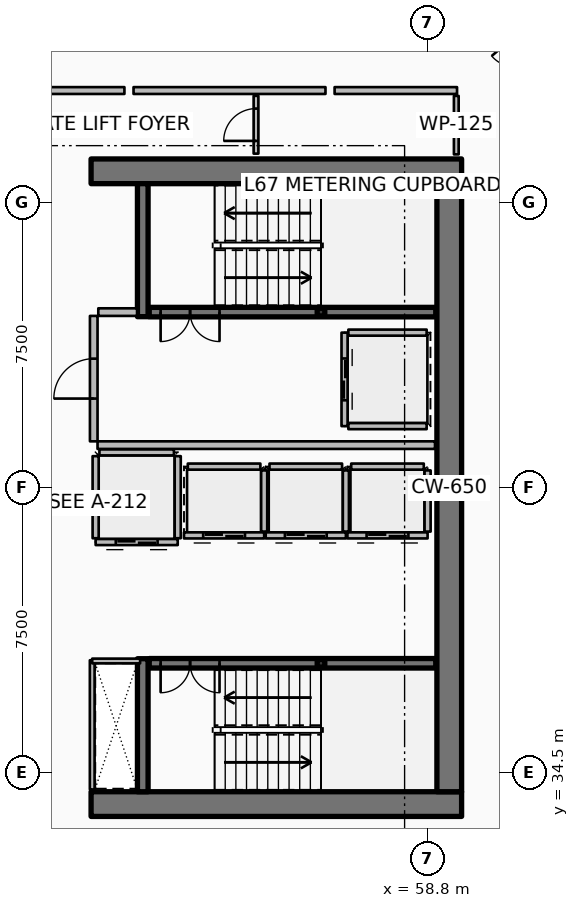
"""IFC4 building model, lengths in metres.
Left out: names, types, materials, properties, quantities, classifications, styles, units other than length and angle.
Written with IfcOpenShell. Run it as: python <this file> out.ifc"""

import sys

from ifc_helpers import new_model, si_unit, direction, frame, frame_2d, origin, origin_2d, place, context, subcontext, project, spatial, rectangle, hollow_rectangle, extrude, element, fill, save


model = new_model("IFC4")
c1 = context("Model", 3, precision=1e-05, world=origin(), true_north=direction((0.0, 1.0)))
c2 = subcontext(c1, "Body", "Model", "MODEL_VIEW")
j1 = project(units=[si_unit("LENGTHUNIT", "METRE"), si_unit("PLANEANGLEUNIT", "RADIAN")], contexts=[c1])
p1 = place(None, origin())
s1 = spatial("IfcSite", under=j1, at=p1, CompositionType="ELEMENT")
p2 = place(p1, origin())
s2 = spatial("IfcBuilding", under=s1, at=p2, CompositionType="ELEMENT")
p3 = place(p2, frame((0.0, 0.0, 267.5)))
s3 = spatial("IfcBuildingStorey", under=s2, at=p3, CompositionType="ELEMENT", Elevation=267.5)
for number, where, z_axis, x_axis in (
    (1, (49.95, 33.675, 0.0), (0.0, 0.0, 1.0), (1.0, 0.0, 0.0)),
    (2, (49.95, 50.325, 0.0), (0.0, 0.0, 1.0), (1.0, 0.0, 0.0)),
):
    element("IfcWall", number, at=place(p3, frame(where, z_axis=z_axis, x_axis=x_axis)), inside=s3, PredefinedType="SHEAR", context=c2, shape_type="SweptSolid", body=[
        extrude(rectangle(XDim=9.75, YDim=0.65, at=frame_2d((4.875, 0.0))), origin(), (0.0, 0.0, 1.0), 3.85),
    ])
p4 = place(p3, frame((59.375, 34.0, 0.0), z_axis=(0.0, 0.0, 1.0), x_axis=(0.0, 1.0, 0.0)))
e3 = element("IfcWall", 3, at=p4, inside=s3, PredefinedType="SHEAR", context=c2, shape_type="SweptSolid", body=[
    extrude(rectangle(XDim=16.0, YDim=0.65, at=frame_2d((8.0, 0.0))), origin(), (0.0, 0.0, 1.0), 3.85),
])
for number, where, z_axis, x_axis in (
    (4, (51.31, 46.5, 0.0), (0.0, 0.0, 1.0), (0.0, 1.0, 0.0)),
    (5, (51.31, 34.0, 0.0), (0.0, 0.0, 1.0), (0.0, 1.0, 0.0)),
):
    element("IfcWall", number, at=place(p3, frame(where, z_axis=z_axis, x_axis=x_axis)), inside=s3, PredefinedType="SHEAR", context=c2, shape_type="SweptSolid", body=[
        extrude(rectangle(XDim=3.5, YDim=0.28, at=frame_2d((1.75, 0.0))), origin(), (0.0, 0.0, 1.0), 3.85),
    ])
for number, where, z_axis, x_axis in (
    (6, (56.0, 46.62, 0.0), (0.0, 0.0, 1.0), (1.0, 0.0, 0.0)),
    (7, (56.0, 37.38, 0.0), (0.0, 0.0, 1.0), (1.0, 0.0, 0.0)),
):
    element("IfcColumn", number, at=place(p3, frame(where, z_axis=z_axis, x_axis=x_axis)), inside=s3, PredefinedType="COLUMN", context=c2, shape_type="SweptSolid", body=[
        extrude(hollow_rectangle(XDim=0.2, YDim=0.2, WallThickness=0.01, InnerFilletRadius=0.01, OuterFilletRadius=0.02, at=origin_2d()), origin(), (0.0, 0.0, 1.0), 1.72),
    ])
p5 = place(p3, frame((51.48, 46.62, 0.0), z_axis=(0.0, 0.0, 1.0), x_axis=(1.0, 0.0, 0.0)))
e8 = element("IfcWall", 8, at=p5, inside=s3, PredefinedType="SOLIDWALL", context=c2, shape_type="SweptSolid", body=[
    extrude(rectangle(XDim=7.54, YDim=0.25, at=frame_2d((3.77, 0.0))), origin(), (0.0, 0.0, 1.0), 3.59),
])
p6 = place(p5, frame((0.3, 0.0, 0.0)))
e9 = element("IfcOpeningElement", 9, at=p6, cuts=e8, PredefinedType="OPENING", context=c2, shape_type="SweptSolid", body=[
    extrude(rectangle(XDim=1.55, YDim=2.15, at=frame_2d((0.775, 1.075))), frame((0.0, 0.135, 0.0), z_axis=(0.0, -1.0, 0.0), x_axis=(1.0, 0.0, 0.0)), (0.0, 0.0, 1.0), 0.27),
])
p7 = place(p3, frame((51.48, 37.38, 0.0), z_axis=(0.0, 0.0, 1.0), x_axis=(1.0, 0.0, 0.0)))
e10 = element("IfcWall", 10, at=p7, inside=s3, PredefinedType="SOLIDWALL", context=c2, shape_type="SweptSolid", body=[
    extrude(rectangle(XDim=7.54, YDim=0.25, at=frame_2d((3.77, 0.0))), origin(), (0.0, 0.0, 1.0), 3.59),
])
p8 = place(p7, frame((0.3, 0.0, 0.0)))
e11 = element("IfcOpeningElement", 11, at=p8, cuts=e10, PredefinedType="OPENING", context=c2, shape_type="SweptSolid", body=[
    extrude(rectangle(XDim=1.55, YDim=2.15, at=frame_2d((0.775, 1.075))), frame((0.0, 0.135, 0.0), z_axis=(0.0, -1.0, 0.0), x_axis=(1.0, 0.0, 0.0)), (0.0, 0.0, 1.0), 0.27),
])
p9 = place(p3, frame((54.505, 40.745, 0.0), z_axis=(0.0, 0.0, 1.0), x_axis=(-1.0, 0.0, 0.0)))
e12 = element("IfcWall", 12, at=p9, inside=s3, PredefinedType="PARTITIONING", context=c2, shape_type="SweptSolid", body=[
    extrude(rectangle(XDim=2.11, YDim=0.16, at=frame_2d((1.055, 0.0))), origin(), (0.0, 0.0, 1.0), 3.59),
])
p10 = place(p9, frame((0.505, 0.0, 0.0)))
e13 = element("IfcOpeningElement", 13, at=p10, cuts=e12, PredefinedType="OPENING", context=c2, shape_type="SweptSolid", body=[
    extrude(rectangle(XDim=1.1, YDim=2.1, at=frame_2d((0.55, 1.05))), frame((0.0, 0.09, 0.0), z_axis=(0.0, -1.0, 0.0), x_axis=(1.0, 0.0, 0.0)), (0.0, 0.0, 1.0), 0.18),
])
p11 = place(p3, frame((54.505, 40.845, 0.0), z_axis=(0.0, 0.0, 1.0), x_axis=(0.0, 1.0, 0.0)))
e14 = element("IfcWall", 14, at=p11, inside=s3, PredefinedType="PARTITIONING", context=c2, shape_type="SweptSolid", body=[
    extrude(rectangle(XDim=1.61, YDim=0.16, at=frame_2d((0.805, 0.0))), origin(), (0.0, 0.0, 1.0), 3.59),
])
p12 = place(p3, frame((52.495, 42.555, 0.0), z_axis=(0.0, 0.0, 1.0), x_axis=(1.0, 0.0, 0.0)))
e15 = element("IfcWall", 15, at=p12, inside=s3, PredefinedType="PARTITIONING", context=c2, shape_type="SweptSolid", body=[
    extrude(rectangle(XDim=1.91, YDim=0.16, at=frame_2d((0.955, 0.0))), origin(), (0.0, 0.0, 1.0), 3.59),
])
p13 = place(p3, frame((56.655, 40.745, 0.0), z_axis=(0.0, 0.0, 1.0), x_axis=(-1.0, 0.0, 0.0)))
e16 = element("IfcWall", 16, at=p13, inside=s3, PredefinedType="PARTITIONING", context=c2, shape_type="SweptSolid", body=[
    extrude(rectangle(XDim=2.11, YDim=0.16, at=frame_2d((1.055, 0.0))), origin(), (0.0, 0.0, 1.0), 3.59),
])
p14 = place(p13, frame((0.505, 0.0, 0.0)))
e17 = element("IfcOpeningElement", 17, at=p14, cuts=e16, PredefinedType="OPENING", context=c2, shape_type="SweptSolid", body=[
    extrude(rectangle(XDim=1.1, YDim=2.1, at=frame_2d((0.55, 1.05))), frame((0.0, 0.09, 0.0), z_axis=(0.0, -1.0, 0.0), x_axis=(1.0, 0.0, 0.0)), (0.0, 0.0, 1.0), 0.18),
])
p15 = place(p3, frame((56.655, 40.845, 0.0), z_axis=(0.0, 0.0, 1.0), x_axis=(0.0, 1.0, 0.0)))
e18 = element("IfcWall", 18, at=p15, inside=s3, PredefinedType="PARTITIONING", context=c2, shape_type="SweptSolid", body=[
    extrude(rectangle(XDim=1.61, YDim=0.16, at=frame_2d((0.805, 0.0))), origin(), (0.0, 0.0, 1.0), 3.59),
])
p16 = place(p3, frame((54.645, 42.555, 0.0), z_axis=(0.0, 0.0, 1.0), x_axis=(1.0, 0.0, 0.0)))
e19 = element("IfcWall", 19, at=p16, inside=s3, PredefinedType="PARTITIONING", context=c2, shape_type="SweptSolid", body=[
    extrude(rectangle(XDim=1.91, YDim=0.16, at=frame_2d((0.955, 0.0))), origin(), (0.0, 0.0, 1.0), 3.59),
])
p17 = place(p3, frame((58.805, 40.745, 0.0), z_axis=(0.0, 0.0, 1.0), x_axis=(-1.0, 0.0, 0.0)))
e20 = element("IfcWall", 20, at=p17, inside=s3, PredefinedType="PARTITIONING", context=c2, shape_type="SweptSolid", body=[
    extrude(rectangle(XDim=2.11, YDim=0.16, at=frame_2d((1.055, 0.0))), origin(), (0.0, 0.0, 1.0), 3.59),
])
p18 = place(p17, frame((0.505, 0.0, 0.0)))
e21 = element("IfcOpeningElement", 21, at=p18, cuts=e20, PredefinedType="OPENING", context=c2, shape_type="SweptSolid", body=[
    extrude(rectangle(XDim=1.1, YDim=2.1, at=frame_2d((0.55, 1.05))), frame((0.0, 0.09, 0.0), z_axis=(0.0, -1.0, 0.0), x_axis=(1.0, 0.0, 0.0)), (0.0, 0.0, 1.0), 0.18),
])
p19 = place(p3, frame((58.805, 40.845, 0.0), z_axis=(0.0, 0.0, 1.0), x_axis=(0.0, 1.0, 0.0)))
e22 = element("IfcWall", 22, at=p19, inside=s3, PredefinedType="PARTITIONING", context=c2, shape_type="SweptSolid", body=[
    extrude(rectangle(XDim=1.61, YDim=0.16, at=frame_2d((0.805, 0.0))), origin(), (0.0, 0.0, 1.0), 3.59),
])
p20 = place(p3, frame((56.795, 42.555, 0.0), z_axis=(0.0, 0.0, 1.0), x_axis=(1.0, 0.0, 0.0)))
e23 = element("IfcWall", 23, at=p20, inside=s3, PredefinedType="PARTITIONING", context=c2, shape_type="SweptSolid", body=[
    extrude(rectangle(XDim=1.91, YDim=0.16, at=frame_2d((0.955, 0.0))), origin(), (0.0, 0.0, 1.0), 3.59),
])
p21 = place(p3, frame((56.62, 46.08, 0.0), z_axis=(0.0, 0.0, 1.0), x_axis=(0.0, -1.0, 0.0)))
e24 = element("IfcWall", 24, at=p21, inside=s3, PredefinedType="PARTITIONING", context=c2, shape_type="SweptSolid", body=[
    extrude(rectangle(XDim=2.46, YDim=0.16, at=frame_2d((1.23, 0.0))), origin(), (0.0, 0.0, 1.0), 3.59),
])
p22 = place(p21, frame((0.68, 0.0, 0.0)))
e25 = element("IfcOpeningElement", 25, at=p22, cuts=e24, PredefinedType="OPENING", context=c2, shape_type="SweptSolid", body=[
    extrude(rectangle(XDim=1.1, YDim=2.1, at=frame_2d((0.55, 1.05))), frame((0.0, 0.09, 0.0), z_axis=(0.0, -1.0, 0.0), x_axis=(1.0, 0.0, 0.0)), (0.0, 0.0, 1.0), 0.18),
])
for number, where, z_axis, x_axis in (
    (26, (56.72, 46.08, 0.0), (0.0, 0.0, 1.0), (1.0, 0.0, 0.0)),
    (27, (56.72, 43.62, 0.0), (0.0, 0.0, 1.0), (1.0, 0.0, 0.0)),
):
    element("IfcWall", number, at=place(p3, frame(where, z_axis=z_axis, x_axis=x_axis)), inside=s3, PredefinedType="PARTITIONING", context=c2, shape_type="SweptSolid", body=[
        extrude(rectangle(XDim=2.06, YDim=0.16, at=frame_2d((1.03, 0.0))), origin(), (0.0, 0.0, 1.0), 3.59),
    ])
p23 = place(p3, frame((52.23, 40.57, 0.0), z_axis=(0.0, 0.0, 1.0), x_axis=(-1.0, 0.0, 0.0)))
e28 = element("IfcWall", 28, at=p23, inside=s3, PredefinedType="PARTITIONING", context=c2, shape_type="SweptSolid", body=[
    extrude(rectangle(XDim=2.16, YDim=0.16, at=frame_2d((1.08, 0.0))), origin(), (0.0, 0.0, 1.0), 3.59),
])
p24 = place(p23, frame((0.53, 0.0, 0.0)))
e29 = element("IfcOpeningElement", 29, at=p24, cuts=e28, PredefinedType="OPENING", context=c2, shape_type="SweptSolid", body=[
    extrude(rectangle(XDim=1.1, YDim=2.1, at=frame_2d((0.55, 1.05))), frame((0.0, 0.09, 0.0), z_axis=(0.0, -1.0, 0.0), x_axis=(1.0, 0.0, 0.0)), (0.0, 0.0, 1.0), 0.18),
])
for number, where, z_axis, x_axis in (
    (30, (52.23, 40.67, 0.0), (0.0, 0.0, 1.0), (0.0, 1.0, 0.0)),
    (31, (50.07, 40.67, 0.0), (0.0, 0.0, 1.0), (0.0, 1.0, 0.0)),
):
    element("IfcWall", number, at=place(p3, frame(where, z_axis=z_axis, x_axis=x_axis)), inside=s3, PredefinedType="PARTITIONING", context=c2, shape_type="SweptSolid", body=[
        extrude(rectangle(XDim=2.16, YDim=0.16, at=frame_2d((1.08, 0.0))), origin(), (0.0, 0.0, 1.0), 3.59),
    ])
p25 = place(p3, frame((50.17, 42.93, 0.0), z_axis=(0.0, 0.0, 1.0), x_axis=(1.0, 0.0, 0.0)))
e32 = element("IfcWall", 32, at=p25, inside=s3, PredefinedType="PARTITIONING", context=c2, shape_type="SweptSolid", body=[
    extrude(rectangle(XDim=1.96, YDim=0.16, at=frame_2d((0.98, 0.0))), origin(), (0.0, 0.0, 1.0), 3.59),
])
p26 = place(p3, frame((50.12, 43.12, 0.0), z_axis=(0.0, 0.0, 1.0), x_axis=(1.0, 0.0, 0.0)))
e33 = element("IfcWall", 33, at=p26, inside=s3, PredefinedType="PARTITIONING", context=c2, shape_type="SweptSolid", body=[
    extrude(rectangle(XDim=8.88, YDim=0.2, at=frame_2d((4.44, 0.0))), origin(), (0.0, 0.0, 1.0), 3.59),
])
p27 = place(p3, frame((50.14, 46.62, 0.0), z_axis=(0.0, 0.0, 1.0), x_axis=(1.0, 0.0, 0.0)))
e34 = element("IfcWall", 34, at=p27, inside=s3, PredefinedType="PARTITIONING", context=c2, shape_type="SweptSolid", body=[
    extrude(rectangle(XDim=1.02, YDim=0.2, at=frame_2d((0.51, 0.0))), origin(), (0.0, 0.0, 1.0), 3.59),
])
p28 = place(p3, frame((50.02, 43.22, 0.0), z_axis=(0.0, 0.0, 1.0), x_axis=(0.0, 1.0, 0.0)))
e35 = element("IfcWall", 35, at=p28, inside=s3, PredefinedType="PARTITIONING", context=c2, shape_type="SweptSolid", body=[
    extrude(rectangle(XDim=3.3, YDim=0.2, at=frame_2d((1.65, 0.0))), origin(), (0.0, 0.0, 1.0), 3.59),
])
p29 = place(p28, frame((1.125, 0.0, 0.0)))
e36 = element("IfcOpeningElement", 36, at=p29, cuts=e35, PredefinedType="OPENING", context=c2, shape_type="SweptSolid", body=[
    extrude(rectangle(XDim=1.05, YDim=2.1, at=frame_2d((0.525, 1.05))), frame((0.0, 0.11, 0.0), z_axis=(0.0, -1.0, 0.0), x_axis=(1.0, 0.0, 0.0)), (0.0, 0.0, 1.0), 0.22),
])
p30 = place(p3, frame((49.98, 34.06, 0.0), z_axis=(0.0, 0.0, 1.0), x_axis=(0.0, 1.0, 0.0)))
e37 = element("IfcWall", 37, at=p30, inside=s3, PredefinedType="PARTITIONING", context=c2, shape_type="SweptSolid", body=[
    extrude(rectangle(XDim=3.4, YDim=0.125, at=frame_2d((1.7, 0.0))), origin(), (0.0, 0.0, 1.0), 3.03),
])
p31 = place(p3, frame((49.98, 37.44, 0.0), z_axis=(0.0, 0.0, 1.0), x_axis=(1.0, 0.0, 0.0)))
e38 = element("IfcWall", 38, at=p31, inside=s3, PredefinedType="PARTITIONING", context=c2, shape_type="SweptSolid", body=[
    extrude(rectangle(XDim=1.26, YDim=0.125, at=frame_2d((0.63, 0.0))), origin(), (0.0, 0.0, 1.0), 3.03),
])
p32 = place(p3, frame((59.56, 50.77, 0.0), z_axis=(0.0, 0.0, 1.0), x_axis=(0.0, 1.0, 0.0)))
e39 = element("IfcWall", 39, at=p32, inside=s3, PredefinedType="PARTITIONING", context=c2, shape_type="SweptSolid", body=[
    extrude(rectangle(XDim=1.54, YDim=0.125, at=frame_2d((0.77, 0.0))), origin(), (0.0, 0.0, 1.0), 3.03),
])
p33 = place(p3, frame((54.29, 50.79, 0.0), z_axis=(0.0, 0.0, 1.0), x_axis=(0.0, 1.0, 0.0)))
e40 = element("IfcWall", 40, at=p33, inside=s3, PredefinedType="PARTITIONING", context=c2, shape_type="SweptSolid", body=[
    extrude(rectangle(XDim=1.52, YDim=0.125, at=frame_2d((0.76, 0.0))), origin(), (0.0, 0.0, 1.0), 3.03),
])
p34 = place(p33, frame((0.335, 0.0, 0.0)))
e41 = element("IfcOpeningElement", 41, at=p34, cuts=e40, PredefinedType="OPENING", context=c2, shape_type="SweptSolid", body=[
    extrude(rectangle(XDim=0.85, YDim=2.06, at=frame_2d((0.425, 1.03))), frame((0.0, 0.073, 0.0), z_axis=(0.0, -1.0, 0.0), x_axis=(1.0, 0.0, 0.0)), (0.0, 0.0, 1.0), 0.145),
])
p35 = place(p3, frame((59.58, 52.45, 0.0), z_axis=(0.0, 0.0, 1.0), x_axis=(-1.0, 0.0, 0.0)))
e42 = element("IfcWall", 42, at=p35, inside=s3, PredefinedType="PARTITIONING", context=c2, shape_type="SweptSolid", body=[
    extrude(rectangle(XDim=3.222, YDim=0.18, at=frame_2d((1.611, 0.0))), origin(), (0.0, 0.0, 1.0), 2.957),
])
p36 = place(p3, frame((56.118, 52.45, 0.0), z_axis=(0.0, 0.0, 1.0), x_axis=(-1.0, 0.0, 0.0)))
e43 = element("IfcWall", 43, at=p36, inside=s3, PredefinedType="PARTITIONING", context=c2, shape_type="SweptSolid", body=[
    extrude(rectangle(XDim=5.051, YDim=0.18, at=frame_2d((2.525, 0.0))), origin(), (0.0, 0.0, 1.0), 2.957),
])
p37 = place(p3, frame((50.827, 52.45, 0.0), z_axis=(0.0, 0.0, 1.0), x_axis=(-1.0, 0.0, 0.0)))
e44 = element("IfcWall", 44, at=p37, inside=s3, PredefinedType="PARTITIONING", context=c2, shape_type="SweptSolid", body=[
    extrude(rectangle(XDim=3.944, YDim=0.18, at=frame_2d((1.972, 0.0))), origin(), (0.0, 0.0, 1.0), 2.957),
])
p38 = place(p6, origin())
e45 = element("IfcDoor", 45, at=p38, inside=s3, OperationType="DOUBLE_DOOR_SINGLE_SWING", PredefinedType="DOOR", context=c2, shape_type="SweptSolid", body=[
    extrude(rectangle(XDim=1.55, YDim=2.15, at=frame_2d((0.775, 1.075))), frame((0.0, 0.025, 0.0), z_axis=(0.0, -1.0, 0.0), x_axis=(1.0, 0.0, 0.0)), (0.0, 0.0, 1.0), 0.05),
])
fill(e9, e45)
p39 = place(p8, origin())
e46 = element("IfcDoor", 46, at=p39, inside=s3, OperationType="DOUBLE_DOOR_SINGLE_SWING", PredefinedType="DOOR", context=c2, shape_type="SweptSolid", body=[
    extrude(rectangle(XDim=1.55, YDim=2.15, at=frame_2d((0.775, 1.075))), frame((0.0, 0.025, 0.0), z_axis=(0.0, -1.0, 0.0), x_axis=(1.0, 0.0, 0.0)), (0.0, 0.0, 1.0), 0.05),
])
fill(e11, e46)
p40 = place(p10, origin())
e47 = element("IfcDoor", 47, at=p40, inside=s3, OperationType="DOUBLE_DOOR_SLIDING", PredefinedType="DOOR", context=c2, shape_type="SweptSolid", body=[
    extrude(rectangle(XDim=1.1, YDim=2.1, at=frame_2d((0.55, 1.05))), frame((0.0, 0.025, 0.0), z_axis=(0.0, -1.0, 0.0), x_axis=(1.0, 0.0, 0.0)), (0.0, 0.0, 1.0), 0.05),
])
fill(e13, e47)
p41 = place(p14, origin())
e48 = element("IfcDoor", 48, at=p41, inside=s3, OperationType="DOUBLE_DOOR_SLIDING", PredefinedType="DOOR", context=c2, shape_type="SweptSolid", body=[
    extrude(rectangle(XDim=1.1, YDim=2.1, at=frame_2d((0.55, 1.05))), frame((0.0, 0.025, 0.0), z_axis=(0.0, -1.0, 0.0), x_axis=(1.0, 0.0, 0.0)), (0.0, 0.0, 1.0), 0.05),
])
fill(e17, e48)
p42 = place(p18, origin())
e49 = element("IfcDoor", 49, at=p42, inside=s3, OperationType="DOUBLE_DOOR_SLIDING", PredefinedType="DOOR", context=c2, shape_type="SweptSolid", body=[
    extrude(rectangle(XDim=1.1, YDim=2.1, at=frame_2d((0.55, 1.05))), frame((0.0, 0.025, 0.0), z_axis=(0.0, -1.0, 0.0), x_axis=(1.0, 0.0, 0.0)), (0.0, 0.0, 1.0), 0.05),
])
fill(e21, e49)
p43 = place(p22, origin())
e50 = element("IfcDoor", 50, at=p43, inside=s3, OperationType="DOUBLE_DOOR_SLIDING", PredefinedType="DOOR", context=c2, shape_type="SweptSolid", body=[
    extrude(rectangle(XDim=1.1, YDim=2.1, at=frame_2d((0.55, 1.05))), frame((0.0, 0.025, 0.0), z_axis=(0.0, -1.0, 0.0), x_axis=(1.0, 0.0, 0.0)), (0.0, 0.0, 1.0), 0.05),
])
fill(e25, e50)
p44 = place(p24, origin())
e51 = element("IfcDoor", 51, at=p44, inside=s3, OperationType="DOUBLE_DOOR_SLIDING", PredefinedType="DOOR", context=c2, shape_type="SweptSolid", body=[
    extrude(rectangle(XDim=1.1, YDim=2.1, at=frame_2d((0.55, 1.05))), frame((0.0, 0.025, 0.0), z_axis=(0.0, -1.0, 0.0), x_axis=(1.0, 0.0, 0.0)), (0.0, 0.0, 1.0), 0.05),
])
fill(e29, e51)
p45 = place(p29, origin())
e52 = element("IfcDoor", 52, at=p45, inside=s3, OperationType="SINGLE_SWING_LEFT", PredefinedType="DOOR", context=c2, shape_type="SweptSolid", body=[
    extrude(rectangle(XDim=1.05, YDim=2.1, at=frame_2d((0.525, 1.05))), frame((0.0, 0.025, 0.0), z_axis=(0.0, -1.0, 0.0), x_axis=(1.0, 0.0, 0.0)), (0.0, 0.0, 1.0), 0.05),
])
fill(e36, e52)
p46 = place(p34, origin())
e53 = element("IfcDoor", 53, at=p46, inside=s3, OperationType="SINGLE_SWING_LEFT", PredefinedType="DOOR", context=c2, shape_type="SweptSolid", body=[
    extrude(rectangle(XDim=0.85, YDim=2.06, at=frame_2d((0.425, 1.03))), frame((0.0, 0.025, 0.0), z_axis=(0.0, -1.0, 0.0), x_axis=(1.0, 0.0, 0.0)), (0.0, 0.0, 1.0), 0.05),
])
fill(e41, e53)
save(model, sys.argv[1])
